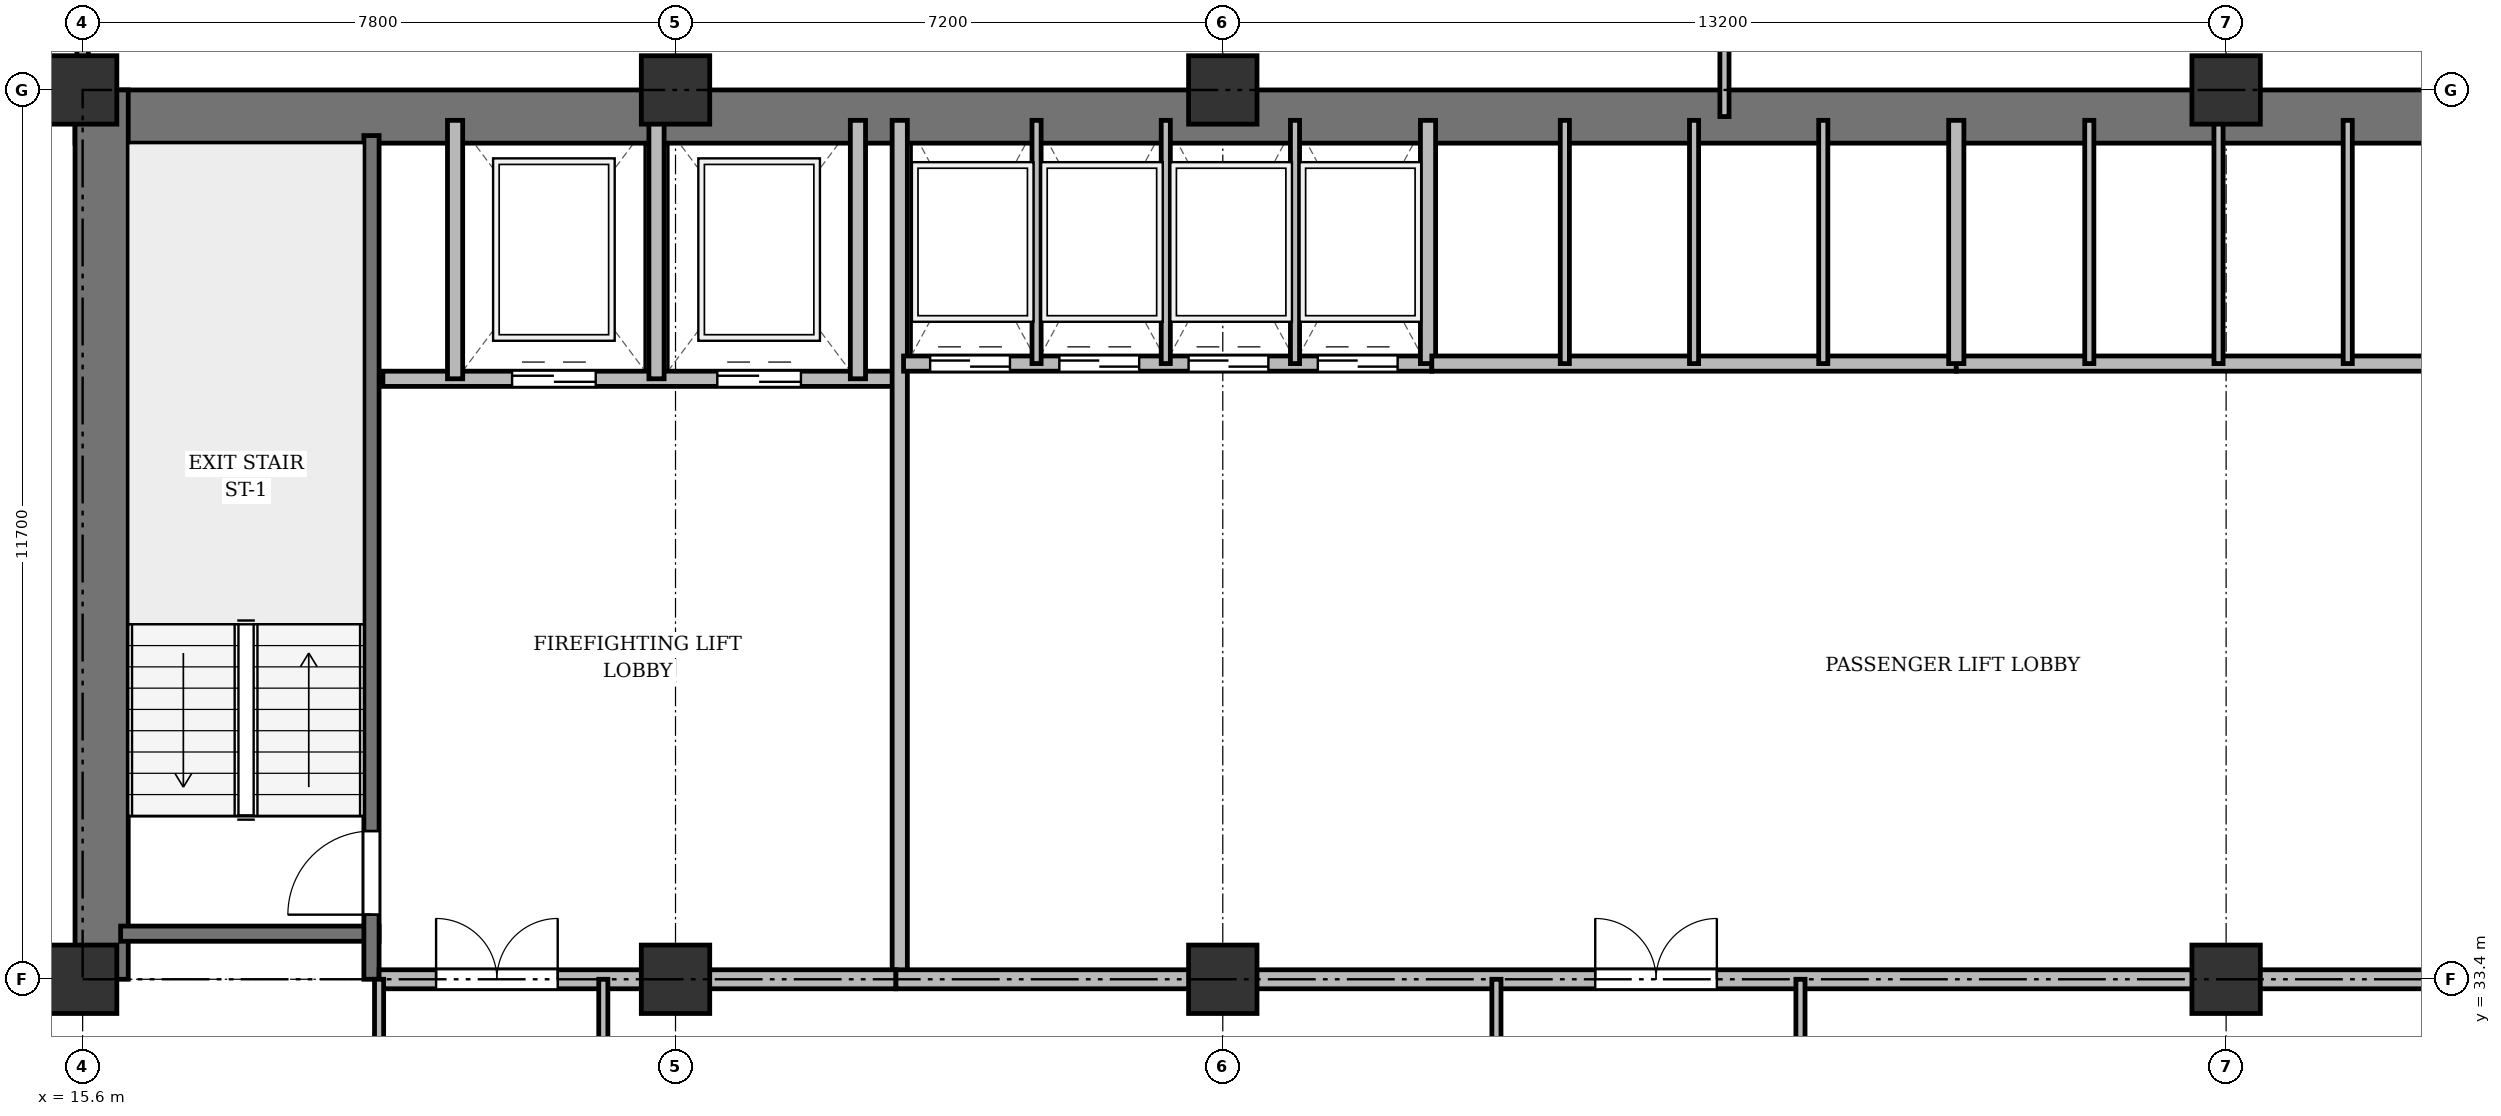
"""IFC4 building model, lengths in metres.
Left out: names, types, materials, properties, quantities, classifications, styles, units other than length and angle.
Written with IfcOpenShell. Run it as: python <this file> out.ifc"""

import sys

from ifc_helpers import new_model, si_unit, direction, frame, frame_2d, origin, origin_2d, place, context, subcontext, project, spatial, rectangle, extrude, source, transform, mapped, element, fill, save


model = new_model("IFC4")
c1 = context("Model", 3, precision=1e-05, world=origin(), true_north=direction((0.0, 1.0)))
c2 = subcontext(c1, "Body", "Model", "MODEL_VIEW")
j1 = project(units=[si_unit("LENGTHUNIT", "METRE"), si_unit("PLANEANGLEUNIT", "RADIAN")], contexts=[c1])
p1 = place(None, origin())
s1 = spatial("IfcSite", under=j1, at=p1, CompositionType="ELEMENT")
p2 = place(p1, origin())
s2 = spatial("IfcBuilding", under=s1, at=p2, CompositionType="ELEMENT")
p3 = place(p2, frame((0.0, 0.0, 59.5)))
s3 = spatial("IfcBuildingStorey", under=s2, at=p3, CompositionType="ELEMENT", Elevation=59.5)
m1 = source(origin(), c2, "Body", "SweptSolid", [
    extrude(rectangle(XDim=0.9, YDim=0.9, at=origin_2d()), origin(), (0.0, 0.0, 1.0), 3.6),
])
for number, where, z_axis, x_axis in (
    (1, (15.6, 33.4, 0.0), (0.0, 0.0, 1.0), (1.0, 0.0, 0.0)),
    (2, (15.6, 45.1, 0.0), (0.0, 0.0, 1.0), (1.0, 0.0, 0.0)),
    (3, (23.4, 33.4, 0.0), (0.0, 0.0, 1.0), (1.0, 0.0, 0.0)),
    (4, (23.4, 45.1, 0.0), (0.0, 0.0, 1.0), (1.0, 0.0, 0.0)),
    (5, (30.6, 33.4, 0.0), (0.0, 0.0, 1.0), (1.0, 0.0, 0.0)),
    (6, (30.6, 45.1, 0.0), (0.0, 0.0, 1.0), (1.0, 0.0, 0.0)),
    (7, (43.8, 33.4, 0.0), (0.0, 0.0, 1.0), (1.0, 0.0, 0.0)),
    (8, (43.8, 45.1, 0.0), (0.0, 0.0, 1.0), (1.0, 0.0, 0.0)),
):
    element("IfcColumn", number, at=place(p3, frame(where, z_axis=z_axis, x_axis=x_axis)), inside=s3, PredefinedType="COLUMN", context=c2, shape_type="MappedRepresentation", body=[
        mapped(m1, transform((0.0, 0.0, 0.0), x_axis=(1.0, 0.0, 0.0), y_axis=(0.0, 1.0, 0.0), z_axis=(0.0, 0.0, 1.0), scale=1.0)),
    ])
p4 = place(p3, frame((15.5, 44.75, 0.0), z_axis=(0.0, 0.0, 1.0), x_axis=(1.0, 0.0, 0.0)))
e9 = element("IfcWall", 9, at=p4, inside=s3, PredefinedType="SHEAR", context=c2, shape_type="SweptSolid", body=[
    extrude(rectangle(XDim=43.4, YDim=0.7, at=frame_2d((21.7, 0.0))), origin(), (0.0, 0.0, 1.0), 3.34),
])
p5 = place(p3, frame((15.85, 33.4, 0.0), z_axis=(0.0, 0.0, 1.0), x_axis=(0.0, 1.0, 0.0)))
e10 = element("IfcWall", 10, at=p5, inside=s3, PredefinedType="SHEAR", context=c2, shape_type="SweptSolid", body=[
    extrude(rectangle(XDim=11.7, YDim=0.7, at=frame_2d((5.85, 0.0))), origin(), (0.0, 0.0, 1.0), 3.34),
])
p6 = place(p3, frame((16.1, 34.0, 0.0), z_axis=(0.0, 0.0, 1.0), x_axis=(1.0, 0.0, 0.0)))
e11 = element("IfcWall", 11, at=p6, inside=s3, PredefinedType="SHEAR", context=c2, shape_type="SweptSolid", body=[
    extrude(rectangle(XDim=3.4, YDim=0.2, at=frame_2d((1.7, 0.0))), origin(), (0.0, 0.0, 1.0), 3.34),
])
p7 = place(p3, frame((19.4, 33.4, 0.0), z_axis=(0.0, 0.0, 1.0), x_axis=(0.0, 1.0, 0.0)))
e12 = element("IfcWall", 12, at=p7, inside=s3, PredefinedType="SHEAR", context=c2, shape_type="SweptSolid", body=[
    extrude(rectangle(XDim=11.1, YDim=0.2, at=frame_2d((5.55, 0.0))), origin(), (0.0, 0.0, 1.0), 3.34),
])
p8 = place(p7, frame((0.85, 0.0, 0.0)))
e13 = element("IfcOpeningElement", 13, at=p8, cuts=e12, PredefinedType="OPENING", context=c2, shape_type="SweptSolid", body=[
    extrude(rectangle(XDim=1.1, YDim=2.15, at=frame_2d((0.55, 1.075))), frame((0.0, 0.11, 0.0), z_axis=(0.0, -1.0, 0.0), x_axis=(1.0, 0.0, 0.0)), (0.0, 0.0, 1.0), 0.22),
])
p9 = place(p3, frame((19.55, 41.3, 0.0), z_axis=(0.0, 0.0, 1.0), x_axis=(1.0, 0.0, 0.0)))
e14 = element("IfcWall", 14, at=p9, inside=s3, PredefinedType="SOLIDWALL", context=c2, shape_type="SweptSolid", body=[
    extrude(rectangle(XDim=6.75, YDim=0.2, at=frame_2d((3.375, 0.0))), origin(), (0.0, 0.0, 1.0), 3.34),
])
p10 = place(p9, frame((1.7, 0.0, 0.0)))
e15 = element("IfcOpeningElement", 15, at=p10, cuts=e14, PredefinedType="OPENING", context=c2, shape_type="SweptSolid", body=[
    extrude(rectangle(XDim=1.1, YDim=2.15, at=frame_2d((0.55, 1.075))), frame((0.0, 0.11, 0.0), z_axis=(0.0, -1.0, 0.0), x_axis=(1.0, 0.0, 0.0)), (0.0, 0.0, 1.0), 0.22),
])
p11 = place(p9, frame((4.4, 0.0, 0.0)))
e16 = element("IfcOpeningElement", 16, at=p11, cuts=e14, PredefinedType="OPENING", context=c2, shape_type="SweptSolid", body=[
    extrude(rectangle(XDim=1.1, YDim=2.15, at=frame_2d((0.55, 1.075))), frame((0.0, 0.11, 0.0), z_axis=(0.0, -1.0, 0.0), x_axis=(1.0, 0.0, 0.0)), (0.0, 0.0, 1.0), 0.22),
])
for number, where, z_axis, x_axis in (
    (17, (20.5, 41.3, 0.0), (0.0, 0.0, 1.0), (0.0, 1.0, 0.0)),
    (18, (23.15, 41.3, 0.0), (0.0, 0.0, 1.0), (0.0, 1.0, 0.0)),
    (19, (25.8, 41.3, 0.0), (0.0, 0.0, 1.0), (0.0, 1.0, 0.0)),
):
    element("IfcWall", number, at=place(p3, frame(where, z_axis=z_axis, x_axis=x_axis)), inside=s3, PredefinedType="SOLIDWALL", context=c2, shape_type="SweptSolid", body=[
        extrude(rectangle(XDim=3.4, YDim=0.2, at=frame_2d((1.7, 0.0))), origin(), (0.0, 0.0, 1.0), 3.34),
    ])
p12 = place(p3, frame((26.35, 33.4, 0.0), z_axis=(0.0, 0.0, 1.0), x_axis=(0.0, 1.0, 0.0)))
e20 = element("IfcWall", 20, at=p12, inside=s3, PredefinedType="SOLIDWALL", context=c2, shape_type="SweptSolid", body=[
    extrude(rectangle(XDim=11.3, YDim=0.2, at=frame_2d((5.65, 0.0))), origin(), (0.0, 0.0, 1.0), 2.69),
])
p13 = place(p3, frame((19.5, 33.4, 0.0), z_axis=(0.0, 0.0, 1.0), x_axis=(1.0, 0.0, 0.0)))
e21 = element("IfcWall", 21, at=p13, inside=s3, PredefinedType="PARTITIONING", context=c2, shape_type="SweptSolid", body=[
    extrude(rectangle(XDim=6.8, YDim=0.25, at=frame_2d((3.4, 0.0))), origin(), (0.0, 0.0, 1.0), 2.69),
])
p14 = place(p13, frame((0.75, 0.0, 0.0)))
e22 = element("IfcOpeningElement", 22, at=p14, cuts=e21, PredefinedType="OPENING", context=c2, shape_type="SweptSolid", body=[
    extrude(rectangle(XDim=1.6, YDim=2.2, at=frame_2d((0.8, 1.1))), frame((0.0, 0.135, 0.0), z_axis=(0.0, -1.0, 0.0), x_axis=(1.0, 0.0, 0.0)), (0.0, 0.0, 1.0), 0.27),
])
p15 = place(p3, frame((26.4, 41.5, 0.0), z_axis=(0.0, 0.0, 1.0), x_axis=(1.0, 0.0, 0.0)))
e23 = element("IfcWall", 23, at=p15, inside=s3, PredefinedType="SOLIDWALL", context=c2, shape_type="SweptSolid", body=[
    extrude(rectangle(XDim=6.95, YDim=0.2, at=frame_2d((3.475, 0.0))), origin(), (0.0, 0.0, 1.0), 3.34),
])
p16 = place(p15, frame((0.35, 0.0, 0.0)))
e24 = element("IfcOpeningElement", 24, at=p16, cuts=e23, PredefinedType="OPENING", context=c2, shape_type="SweptSolid", body=[
    extrude(rectangle(XDim=1.05, YDim=2.15, at=frame_2d((0.525, 1.075))), frame((0.0, 0.11, 0.0), z_axis=(0.0, -1.0, 0.0), x_axis=(1.0, 0.0, 0.0)), (0.0, 0.0, 1.0), 0.22),
])
p17 = place(p15, frame((2.05, 0.0, 0.0)))
e25 = element("IfcOpeningElement", 25, at=p17, cuts=e23, PredefinedType="OPENING", context=c2, shape_type="SweptSolid", body=[
    extrude(rectangle(XDim=1.05, YDim=2.15, at=frame_2d((0.525, 1.075))), frame((0.0, 0.11, 0.0), z_axis=(0.0, -1.0, 0.0), x_axis=(1.0, 0.0, 0.0)), (0.0, 0.0, 1.0), 0.22),
])
p18 = place(p15, frame((3.75, 0.0, 0.0)))
e26 = element("IfcOpeningElement", 26, at=p18, cuts=e23, PredefinedType="OPENING", context=c2, shape_type="SweptSolid", body=[
    extrude(rectangle(XDim=1.05, YDim=2.15, at=frame_2d((0.525, 1.075))), frame((0.0, 0.11, 0.0), z_axis=(0.0, -1.0, 0.0), x_axis=(1.0, 0.0, 0.0)), (0.0, 0.0, 1.0), 0.22),
])
p19 = place(p15, frame((5.45, 0.0, 0.0)))
e27 = element("IfcOpeningElement", 27, at=p19, cuts=e23, PredefinedType="OPENING", context=c2, shape_type="SweptSolid", body=[
    extrude(rectangle(XDim=1.05, YDim=2.15, at=frame_2d((0.525, 1.075))), frame((0.0, 0.11, 0.0), z_axis=(0.0, -1.0, 0.0), x_axis=(1.0, 0.0, 0.0)), (0.0, 0.0, 1.0), 0.22),
])
p20 = place(p3, frame((33.3, 41.5, 0.0), z_axis=(0.0, 0.0, 1.0), x_axis=(0.0, 1.0, 0.0)))
e28 = element("IfcWall", 28, at=p20, inside=s3, PredefinedType="SOLIDWALL", context=c2, shape_type="SweptSolid", body=[
    extrude(rectangle(XDim=3.2, YDim=0.2, at=frame_2d((1.6, 0.0))), origin(), (0.0, 0.0, 1.0), 3.34),
])
for number, where, z_axis, x_axis in (
    (29, (28.15, 41.5, 0.0), (0.0, 0.0, 1.0), (0.0, 1.0, 0.0)),
    (30, (29.85, 41.5, 0.0), (0.0, 0.0, 1.0), (0.0, 1.0, 0.0)),
    (31, (31.55, 41.5, 0.0), (0.0, 0.0, 1.0), (0.0, 1.0, 0.0)),
):
    element("IfcWall", number, at=place(p3, frame(where, z_axis=z_axis, x_axis=x_axis)), inside=s3, PredefinedType="PARTITIONING", context=c2, shape_type="SweptSolid", body=[
        extrude(rectangle(XDim=3.2, YDim=0.12, at=frame_2d((1.6, 0.0))), origin(), (0.0, 0.0, 1.0), 3.34),
    ])
p21 = place(p3, frame((33.35, 41.5, 0.0), z_axis=(0.0, 0.0, 1.0), x_axis=(1.0, 0.0, 0.0)))
e32 = element("IfcWall", 32, at=p21, inside=s3, PredefinedType="SOLIDWALL", context=c2, shape_type="SweptSolid", body=[
    extrude(rectangle(XDim=6.9, YDim=0.2, at=frame_2d((3.45, 0.0))), origin(), (0.0, 0.0, 1.0), 3.34),
])
for number, where, z_axis, x_axis in (
    (33, (35.1, 41.5, 0.0), (0.0, 0.0, 1.0), (0.0, 1.0, 0.0)),
    (34, (36.8, 41.5, 0.0), (0.0, 0.0, 1.0), (0.0, 1.0, 0.0)),
    (35, (38.5, 41.5, 0.0), (0.0, 0.0, 1.0), (0.0, 1.0, 0.0)),
):
    element("IfcWall", number, at=place(p3, frame(where, z_axis=z_axis, x_axis=x_axis)), inside=s3, PredefinedType="PARTITIONING", context=c2, shape_type="SweptSolid", body=[
        extrude(rectangle(XDim=3.2, YDim=0.12, at=frame_2d((1.6, 0.0))), origin(), (0.0, 0.0, 1.0), 3.34),
    ])
p22 = place(p3, frame((40.25, 41.5, 0.0), z_axis=(0.0, 0.0, 1.0), x_axis=(1.0, 0.0, 0.0)))
e36 = element("IfcWall", 36, at=p22, inside=s3, PredefinedType="SOLIDWALL", context=c2, shape_type="SweptSolid", body=[
    extrude(rectangle(XDim=6.9, YDim=0.2, at=frame_2d((3.45, 0.0))), origin(), (0.0, 0.0, 1.0), 2.752),
])
p23 = place(p3, frame((40.25, 41.5, 0.0), z_axis=(0.0, 0.0, 1.0), x_axis=(0.0, 1.0, 0.0)))
e37 = element("IfcWall", 37, at=p23, inside=s3, PredefinedType="SOLIDWALL", context=c2, shape_type="SweptSolid", body=[
    extrude(rectangle(XDim=3.2, YDim=0.2, at=frame_2d((1.6, 0.0))), origin(), (0.0, 0.0, 1.0), 3.34),
])
p24 = place(p3, frame((42.0, 41.5, 0.0), z_axis=(0.0, 0.0, 1.0), x_axis=(0.0, 1.0, 0.0)))
e38 = element("IfcWall", 38, at=p24, inside=s3, PredefinedType="PARTITIONING", context=c2, shape_type="SweptSolid", body=[
    extrude(rectangle(XDim=3.2, YDim=0.12, at=frame_2d((1.6, 0.0))), origin(), (0.0, 0.0, 1.0), 3.34),
])
p25 = place(p3, frame((43.7, 41.5, 0.0), z_axis=(0.0, 0.0, 1.0), x_axis=(0.0, 1.0, 0.0)))
e39 = element("IfcWall", 39, at=p25, inside=s3, PredefinedType="PARTITIONING", context=c2, shape_type="SweptSolid", body=[
    extrude(rectangle(XDim=3.2, YDim=0.12, at=frame_2d((1.6, 0.0))), origin(), (0.0, 0.0, 1.0), 2.752),
])
p26 = place(p3, frame((45.4, 41.5, 0.0), z_axis=(0.0, 0.0, 1.0), x_axis=(0.0, 1.0, 0.0)))
e40 = element("IfcWall", 40, at=p26, inside=s3, PredefinedType="PARTITIONING", context=c2, shape_type="SweptSolid", body=[
    extrude(rectangle(XDim=3.2, YDim=0.12, at=frame_2d((1.6, 0.0))), origin(), (0.0, 0.0, 1.0), 3.34),
])
p27 = place(p3, frame((26.3, 33.4, 0.0), z_axis=(0.0, 0.0, 1.0), x_axis=(1.0, 0.0, 0.0)))
e41 = element("IfcWall", 41, at=p27, inside=s3, PredefinedType="PARTITIONING", context=c2, shape_type="SweptSolid", body=[
    extrude(rectangle(XDim=20.85, YDim=0.25, at=frame_2d((10.425, 0.0))), origin(), (0.0, 0.0, 1.0), 2.69),
])
p28 = place(p27, frame((9.2, 0.0, 0.0)))
e42 = element("IfcOpeningElement", 42, at=p28, cuts=e41, PredefinedType="OPENING", context=c2, shape_type="SweptSolid", body=[
    extrude(rectangle(XDim=1.6, YDim=2.2, at=frame_2d((0.8, 1.1))), frame((0.0, 0.135, 0.0), z_axis=(0.0, -1.0, 0.0), x_axis=(1.0, 0.0, 0.0)), (0.0, 0.0, 1.0), 0.27),
])
for number, where, z_axis, x_axis in (
    (43, (19.5, 29.8, 0.0), (0.0, 0.0, 1.0), (0.0, 1.0, 0.0)),
    (44, (22.45, 29.8, 0.0), (0.0, 0.0, 1.0), (0.0, 1.0, 0.0)),
    (45, (34.2, 29.8, 0.0), (0.0, 0.0, 1.0), (0.0, 1.0, 0.0)),
    (46, (38.2, 29.8, 0.0), (0.0, 0.0, 1.0), (0.0, 1.0, 0.0)),
):
    element("IfcWall", number, at=place(p3, frame(where, z_axis=z_axis, x_axis=x_axis)), inside=s3, PredefinedType="PARTITIONING", context=c2, shape_type="SweptSolid", body=[
        extrude(rectangle(XDim=3.6, YDim=0.12, at=frame_2d((1.8, 0.0))), origin(), (0.0, 0.0, 1.0), 2.69),
    ])
p29 = place(p3, frame((4.75, 33.4, 0.0), z_axis=(0.0, 0.0, 1.0), x_axis=(1.0, 0.0, 0.0)))
e47 = element("IfcWall", 47, at=p29, inside=s3, PredefinedType="PARTITIONING", context=c2, shape_type="SweptSolid", body=[
    extrude(rectangle(XDim=10.85, YDim=0.15, at=frame_2d((5.425, 0.0))), origin(), (0.0, 0.0, 1.0), 2.69),
])
p30 = place(p29, frame((4.94, 0.0, 0.0)))
e48 = element("IfcOpeningElement", 48, at=p30, cuts=e47, PredefinedType="OPENING", context=c2, shape_type="SweptSolid", body=[
    extrude(rectangle(XDim=0.95, YDim=2.15, at=frame_2d((0.475, 1.075))), frame((0.0, 0.085, 0.0), z_axis=(0.0, -1.0, 0.0), x_axis=(1.0, 0.0, 0.0)), (0.0, 0.0, 1.0), 0.17),
])
p31 = place(p3, frame((37.2, 44.75, 0.0), z_axis=(0.0, 0.0, 1.0), x_axis=(0.0, 1.0, 0.0)))
e49 = element("IfcWall", 49, at=p31, inside=s3, PredefinedType="PARTITIONING", context=c2, shape_type="SweptSolid", body=[
    extrude(rectangle(XDim=3.61, YDim=0.12, at=frame_2d((1.805, 0.0))), origin(), (0.0, 0.0, 1.0), 2.69),
])
p32 = place(p31, frame((1.1, 0.0, 0.0)))
e50 = element("IfcOpeningElement", 50, at=p32, cuts=e49, PredefinedType="OPENING", context=c2, shape_type="SweptSolid", body=[
    extrude(rectangle(XDim=0.95, YDim=2.15, at=frame_2d((0.475, 1.075))), frame((0.0, 0.07, 0.0), z_axis=(0.0, -1.0, 0.0), x_axis=(1.0, 0.0, 0.0)), (0.0, 0.0, 1.0), 0.14),
])
p33 = place(p3, frame((15.6, 44.75, 0.0), z_axis=(0.0, 0.0, 1.0), x_axis=(0.0, 1.0, 0.0)))
e51 = element("IfcWall", 51, at=p33, inside=s3, PredefinedType="PARTITIONING", context=c2, shape_type="SweptSolid", body=[
    extrude(rectangle(XDim=3.61, YDim=0.15, at=frame_2d((1.805, 0.0))), origin(), (0.0, 0.0, 1.0), 2.752),
])
p34 = place(p33, frame((1.1, 0.0, 0.0)))
e52 = element("IfcOpeningElement", 52, at=p34, cuts=e51, PredefinedType="OPENING", context=c2, shape_type="SweptSolid", body=[
    extrude(rectangle(XDim=0.95, YDim=2.15, at=frame_2d((0.475, 1.075))), frame((0.0, 0.085, 0.0), z_axis=(0.0, -1.0, 0.0), x_axis=(1.0, 0.0, 0.0)), (0.0, 0.0, 1.0), 0.17),
])
m2 = source(origin(), c2, "Body", "SweptSolid", [
    extrude(rectangle(XDim=1.1, YDim=2.15, at=frame_2d((0.55, 1.075))), frame((0.0, 0.025, 0.0), z_axis=(0.0, -1.0, 0.0), x_axis=(1.0, 0.0, 0.0)), (0.0, 0.0, 1.0), 0.05),
])
p35 = place(p8, origin())
e53 = element("IfcDoor", 53, at=p35, inside=s3, OperationType="SINGLE_SWING_LEFT", PredefinedType="DOOR", context=c2, shape_type="MappedRepresentation", body=[
    mapped(m2, transform((0.0, 0.0, 0.0), x_axis=(1.0, 0.0, 0.0), y_axis=(0.0, 1.0, 0.0), z_axis=(0.0, 0.0, 1.0), scale=1.0)),
])
fill(e13, e53)
p36 = place(p10, origin())
e54 = element("IfcDoor", 54, at=p36, inside=s3, OperationType="DOUBLE_DOOR_SLIDING", PredefinedType="DOOR", context=c2, shape_type="MappedRepresentation", body=[
    mapped(m2, transform((0.0, 0.0, 0.0), x_axis=(1.0, 0.0, 0.0), y_axis=(0.0, 1.0, 0.0), z_axis=(0.0, 0.0, 1.0), scale=1.0)),
])
fill(e15, e54)
p37 = place(p11, origin())
e55 = element("IfcDoor", 55, at=p37, inside=s3, OperationType="DOUBLE_DOOR_SLIDING", PredefinedType="DOOR", context=c2, shape_type="MappedRepresentation", body=[
    mapped(m2, transform((0.0, 0.0, 0.0), x_axis=(1.0, 0.0, 0.0), y_axis=(0.0, 1.0, 0.0), z_axis=(0.0, 0.0, 1.0), scale=1.0)),
])
fill(e16, e55)
m3 = source(origin(), c2, "Body", "SweptSolid", [
    extrude(rectangle(XDim=1.6, YDim=2.2, at=frame_2d((0.8, 1.1))), frame((0.0, 0.025, 0.0), z_axis=(0.0, -1.0, 0.0), x_axis=(1.0, 0.0, 0.0)), (0.0, 0.0, 1.0), 0.05),
])
p38 = place(p14, origin())
e56 = element("IfcDoor", 56, at=p38, inside=s3, OperationType="DOUBLE_DOOR_SINGLE_SWING", PredefinedType="DOOR", context=c2, shape_type="MappedRepresentation", body=[
    mapped(m3, transform((0.0, 0.0, 0.0), x_axis=(1.0, 0.0, 0.0), y_axis=(0.0, 1.0, 0.0), z_axis=(0.0, 0.0, 1.0), scale=1.0)),
])
fill(e22, e56)
m4 = source(origin(), c2, "Body", "SweptSolid", [
    extrude(rectangle(XDim=1.05, YDim=2.15, at=frame_2d((0.525, 1.075))), frame((0.0, 0.025, 0.0), z_axis=(0.0, -1.0, 0.0), x_axis=(1.0, 0.0, 0.0)), (0.0, 0.0, 1.0), 0.05),
])
p39 = place(p16, origin())
e57 = element("IfcDoor", 57, at=p39, inside=s3, OperationType="DOUBLE_DOOR_SLIDING", PredefinedType="DOOR", context=c2, shape_type="MappedRepresentation", body=[
    mapped(m4, transform((0.0, 0.0, 0.0), x_axis=(1.0, 0.0, 0.0), y_axis=(0.0, 1.0, 0.0), z_axis=(0.0, 0.0, 1.0), scale=1.0)),
])
fill(e24, e57)
p40 = place(p17, origin())
e58 = element("IfcDoor", 58, at=p40, inside=s3, OperationType="DOUBLE_DOOR_SLIDING", PredefinedType="DOOR", context=c2, shape_type="MappedRepresentation", body=[
    mapped(m4, transform((0.0, 0.0, 0.0), x_axis=(1.0, 0.0, 0.0), y_axis=(0.0, 1.0, 0.0), z_axis=(0.0, 0.0, 1.0), scale=1.0)),
])
fill(e25, e58)
p41 = place(p18, origin())
e59 = element("IfcDoor", 59, at=p41, inside=s3, OperationType="DOUBLE_DOOR_SLIDING", PredefinedType="DOOR", context=c2, shape_type="MappedRepresentation", body=[
    mapped(m4, transform((0.0, 0.0, 0.0), x_axis=(1.0, 0.0, 0.0), y_axis=(0.0, 1.0, 0.0), z_axis=(0.0, 0.0, 1.0), scale=1.0)),
])
fill(e26, e59)
p42 = place(p19, origin())
e60 = element("IfcDoor", 60, at=p42, inside=s3, OperationType="DOUBLE_DOOR_SLIDING", PredefinedType="DOOR", context=c2, shape_type="MappedRepresentation", body=[
    mapped(m4, transform((0.0, 0.0, 0.0), x_axis=(1.0, 0.0, 0.0), y_axis=(0.0, 1.0, 0.0), z_axis=(0.0, 0.0, 1.0), scale=1.0)),
])
fill(e27, e60)
p43 = place(p28, origin())
e61 = element("IfcDoor", 61, at=p43, inside=s3, OperationType="DOUBLE_DOOR_SINGLE_SWING", PredefinedType="DOOR", context=c2, shape_type="MappedRepresentation", body=[
    mapped(m3, transform((0.0, 0.0, 0.0), x_axis=(1.0, 0.0, 0.0), y_axis=(0.0, 1.0, 0.0), z_axis=(0.0, 0.0, 1.0), scale=1.0)),
])
fill(e42, e61)
save(model, sys.argv[1])
